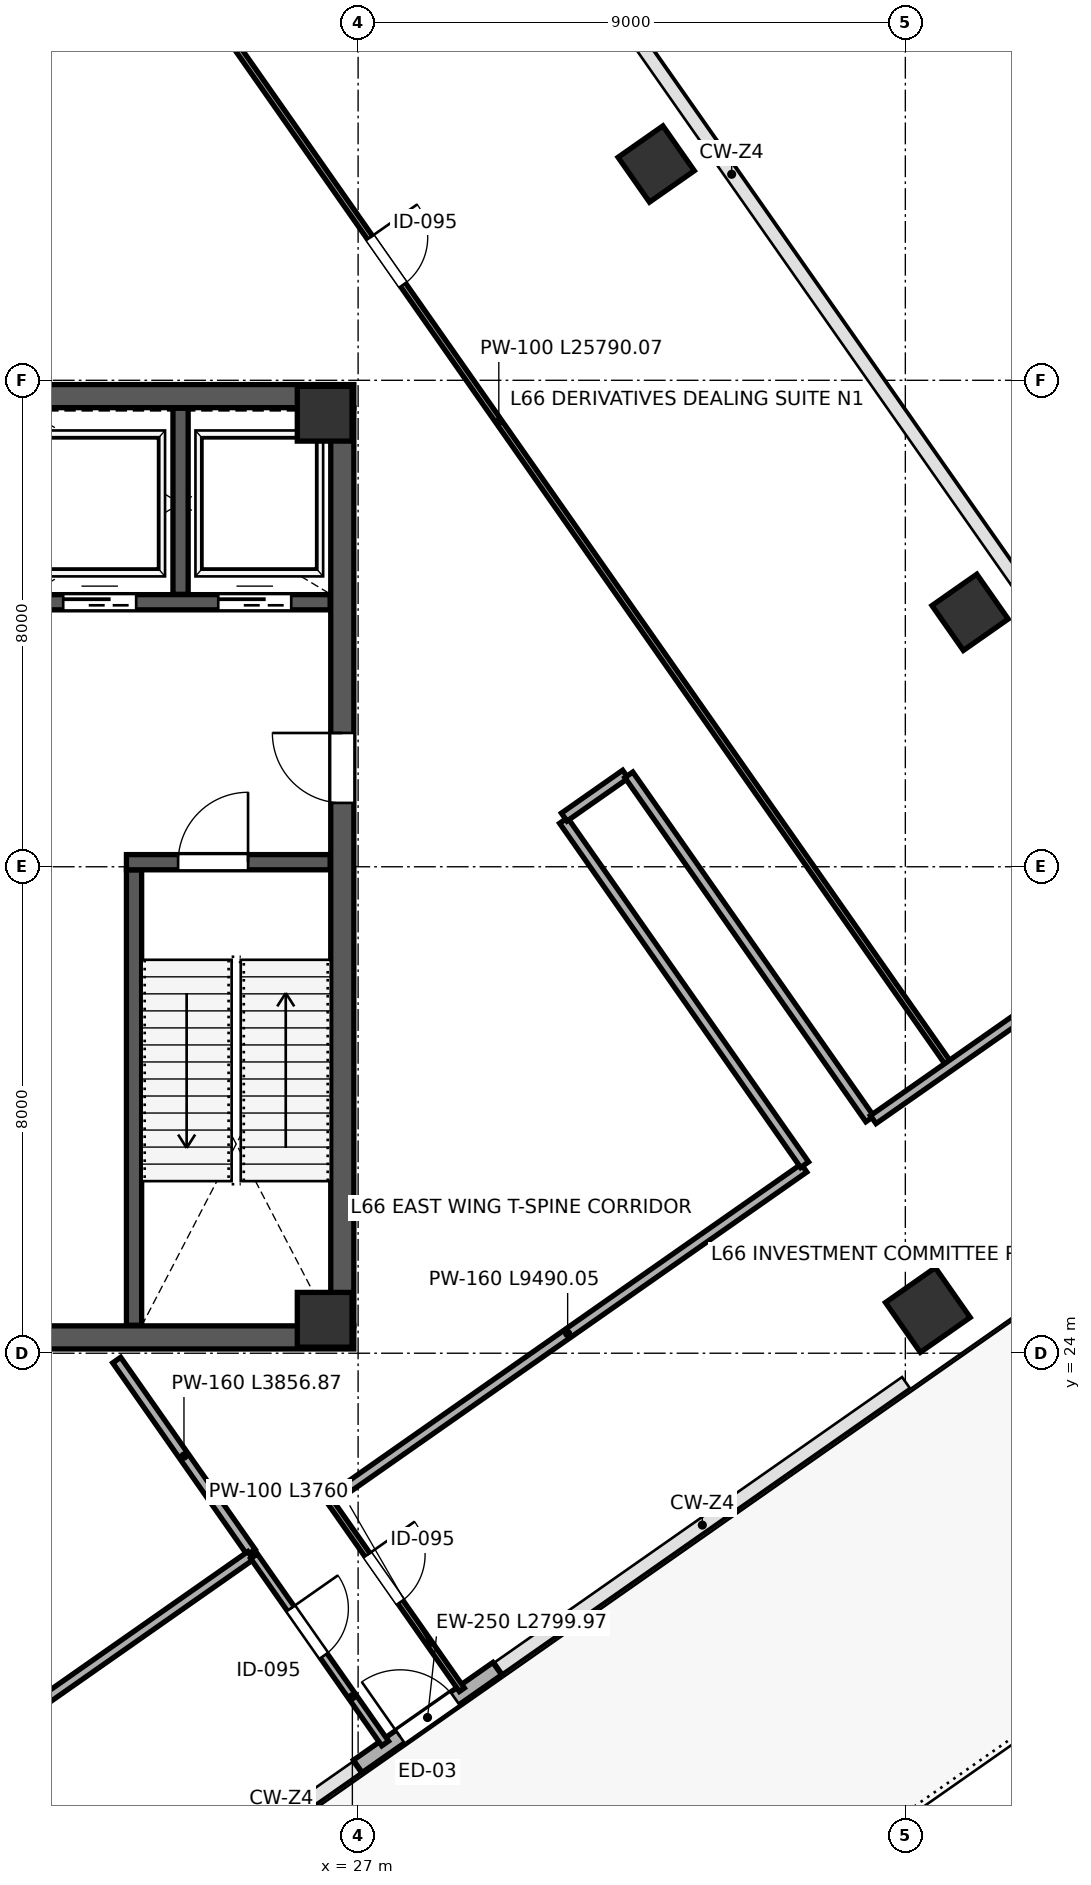
"""IFC4 building model, lengths in metres.
Left out: names, types, materials, properties, quantities, classifications, styles, units other than length and angle.
Written with IfcOpenShell. Run it as: python <this file> out.ifc"""

import sys

from ifc_helpers import new_model, si_unit, direction, frame, frame_2d, origin, origin_2d, place, context, subcontext, project, spatial, rectangle, extrude, source, transform, mapped, element, fill, save


model = new_model("IFC4")
c1 = context("Model", 3, precision=1e-05, world=origin(), true_north=direction((0.0, 1.0)))
c2 = subcontext(c1, "Body", "Model", "MODEL_VIEW")
j1 = project(units=[si_unit("LENGTHUNIT", "METRE"), si_unit("PLANEANGLEUNIT", "RADIAN")], contexts=[c1])
p1 = place(None, origin())
s1 = spatial("IfcSite", under=j1, at=p1, CompositionType="ELEMENT")
p2 = place(p1, origin())
s2 = spatial("IfcBuilding", under=s1, at=p2, CompositionType="ELEMENT")
p3 = place(p2, frame((0.0, 0.0, 293.8)))
s3 = spatial("IfcBuildingStorey", under=s2, at=p3, CompositionType="ELEMENT", Elevation=293.8)
m1 = source(origin(), c2, "Body", "SweptSolid", [
    extrude(rectangle(XDim=0.9, YDim=0.9, at=origin_2d()), origin(), (0.0, 0.0, 1.0), 4.999),
])
for number, where, z_axis, x_axis in (
    (1, (26.45, 24.55, 0.001), (0.0, 0.0, 1.0), (1.0, 0.0, 0.0)),
    (2, (26.45, 39.45, 0.001), (0.0, 0.0, 1.0), (1.0, 0.0, 0.0)),
):
    element("IfcColumn", number, at=place(p3, frame(where, z_axis=z_axis, x_axis=x_axis)), inside=s3, PredefinedType="COLUMN", context=c2, shape_type="MappedRepresentation", body=[
        mapped(m1, transform((0.0, 0.0, 0.0), scale=1.0)),
    ])
m2 = source(origin(), c2, "Body", "SweptSolid", [
    extrude(rectangle(XDim=0.9, YDim=0.9, at=origin_2d()), origin(), (0.0, 0.0, 1.0), 4.999),
])
for number, where, z_axis, x_axis in (
    (3, (31.903, 43.557, 0.001), (0.0, 0.0, 1.0), (-0.574, 0.819, 0.0)),
    (4, (37.065, 36.184, 0.001), (0.0, 0.0, 1.0), (-0.574, 0.819, 0.0)),
):
    element("IfcColumn", number, at=place(p3, frame(where, z_axis=z_axis, x_axis=x_axis)), inside=s3, PredefinedType="COLUMN", context=c2, shape_type="MappedRepresentation", body=[
        mapped(m2, transform((0.0, 0.0, 0.0), scale=1.0)),
    ])
m3 = source(origin(), c2, "Body", "SweptSolid", [
    extrude(rectangle(XDim=1.0, YDim=1.0, at=origin_2d()), origin(), (0.0, 0.0, 1.0), 4.999),
])
p4 = place(p3, frame((36.37, 24.711, 0.001), z_axis=(0.0, 0.0, 1.0), x_axis=(-0.573576436351, 0.819152044289, 0.0)))
e5 = element("IfcColumn", 5, at=p4, inside=s3, PredefinedType="COLUMN", context=c2, shape_type="MappedRepresentation", body=[
    mapped(m3, transform((0.0, 0.0, 0.0), scale=1.0)),
])
p5 = place(p3, frame((26.995, 17.206, 0.0), z_axis=(0.0, 0.0, 1.0), x_axis=(0.819141785879, 0.573591086599, 0.0)))
e6 = element("IfcWall", 6, at=p5, inside=s3, PredefinedType="SOLIDWALL", context=c2, shape_type="SweptSolid", body=[
    extrude(rectangle(XDim=2.8, YDim=0.25, at=frame_2d((1.4, 0.0))), origin(), (0.0, 0.0, 1.0), 4.76),
])
p6 = place(p5, frame((0.85, 0.0, 0.0)))
e7 = element("IfcOpeningElement", 7, at=p6, cuts=e6, PredefinedType="OPENING", context=c2, shape_type="SweptSolid", body=[
    extrude(rectangle(XDim=1.1, YDim=2.2, at=frame_2d((0.55, 1.1))), frame((0.0, 0.135, 0.0), z_axis=(0.0, -1.0, 0.0), x_axis=(1.0, 0.0, 0.0)), (0.0, 0.0, 1.0), 0.27),
])
p7 = place(p3, frame((26.74, 24.45, 0.0), z_axis=(0.0, 0.0, 1.0), x_axis=(0.0, 1.0, 0.0)))
e8 = element("IfcWall", 8, at=p7, inside=s3, PredefinedType="SHEAR", context=c2, shape_type="SweptSolid", body=[
    extrude(rectangle(XDim=15.1, YDim=0.38, at=frame_2d((7.55, 0.0))), origin(), (0.0, 0.0, 1.0), 4.76),
])
p8 = place(p7, frame((8.6, 0.0, 0.0)))
e9 = element("IfcOpeningElement", 9, at=p8, cuts=e8, PredefinedType="OPENING", context=c2, shape_type="SweptSolid", body=[
    extrude(rectangle(XDim=1.15, YDim=2.2, at=frame_2d((0.575, 1.1))), frame((0.0, 0.2, 0.0), z_axis=(0.0, -1.0, 0.0), x_axis=(1.0, 0.0, 0.0)), (0.0, 0.0, 1.0), 0.4),
])
for number, where, z_axis, x_axis in (
    (10, (9.07, 24.26, 0.0), (0.0, 0.0, 1.0), (1.0, 0.0, 0.0)),
    (11, (9.07, 39.74, 0.0), (0.0, 0.0, 1.0), (1.0, 0.0, 0.0)),
):
    element("IfcWall", number, at=place(p3, frame(where, z_axis=z_axis, x_axis=x_axis)), inside=s3, PredefinedType="SHEAR", context=c2, shape_type="SweptSolid", body=[
        extrude(rectangle(XDim=17.86, YDim=0.38, at=frame_2d((8.93, 0.0))), origin(), (0.0, 0.0, 1.0), 4.76),
    ])
p9 = place(p3, frame((23.315, 24.46, 0.0), z_axis=(0.0, 0.0, 1.0), x_axis=(0.0, 1.0, 0.0)))
e12 = element("IfcWall", 12, at=p9, inside=s3, PredefinedType="SHEAR", context=c2, shape_type="SweptSolid", body=[
    extrude(rectangle(XDim=7.49, YDim=0.25, at=frame_2d((3.745, 0.0))), origin(), (0.0, 0.0, 1.0), 4.76),
])
p10 = place(p3, frame((23.19, 32.075, 0.0), z_axis=(0.0, 0.0, 1.0), x_axis=(1.0, 0.0, 0.0)))
e13 = element("IfcWall", 13, at=p10, inside=s3, PredefinedType="SHEAR", context=c2, shape_type="SweptSolid", body=[
    extrude(rectangle(XDim=3.35, YDim=0.25, at=frame_2d((1.675, 0.0))), origin(), (0.0, 0.0, 1.0), 4.76),
])
p11 = place(p10, frame((0.85, 0.0, 0.0)))
e14 = element("IfcOpeningElement", 14, at=p11, cuts=e13, PredefinedType="OPENING", context=c2, shape_type="SweptSolid", body=[
    extrude(rectangle(XDim=1.15, YDim=2.2, at=frame_2d((0.575, 1.1))), frame((0.0, 0.135, 0.0), z_axis=(0.0, -1.0, 0.0), x_axis=(1.0, 0.0, 0.0)), (0.0, 0.0, 1.0), 0.27),
])
p12 = place(p3, frame((21.45, 36.35, 0.0), z_axis=(0.0, 0.0, 1.0), x_axis=(1.0, 0.0, 0.0)))
e15 = element("IfcWall", 15, at=p12, inside=s3, PredefinedType="SHEAR", context=c2, shape_type="SweptSolid", body=[
    extrude(rectangle(XDim=5.09, YDim=0.25, at=frame_2d((2.545, 0.0))), origin(), (0.0, 0.0, 1.0), 4.76),
])
p13 = place(p12, frame((0.7, 0.0, 0.0)))
e16 = element("IfcOpeningElement", 16, at=p13, cuts=e15, PredefinedType="OPENING", context=c2, shape_type="SweptSolid", body=[
    extrude(rectangle(XDim=1.2, YDim=2.2, at=frame_2d((0.6, 1.1))), frame((0.0, 0.135, 0.0), z_axis=(0.0, -1.0, 0.0), x_axis=(1.0, 0.0, 0.0)), (0.0, 0.0, 1.0), 0.27),
])
p14 = place(p12, frame((3.25, 0.0, 0.0)))
e17 = element("IfcOpeningElement", 17, at=p14, cuts=e15, PredefinedType="OPENING", context=c2, shape_type="SweptSolid", body=[
    extrude(rectangle(XDim=1.2, YDim=2.2, at=frame_2d((0.6, 1.1))), frame((0.0, 0.135, 0.0), z_axis=(0.0, -1.0, 0.0), x_axis=(1.0, 0.0, 0.0)), (0.0, 0.0, 1.0), 0.27),
])
p15 = place(p3, frame((24.08, 36.48, 0.0), z_axis=(0.0, 0.0, 1.0), x_axis=(0.0, 1.0, 0.0)))
e18 = element("IfcWall", 18, at=p15, inside=s3, PredefinedType="SHEAR", context=c2, shape_type="SweptSolid", body=[
    extrude(rectangle(XDim=3.06, YDim=0.25, at=frame_2d((1.53, 0.0))), origin(), (0.0, 0.0, 1.0), 4.76),
])
p16 = place(p3, frame((23.03, 23.887, 0.0), z_axis=(0.0, 0.0, 1.0), x_axis=(0.573602525203, -0.819133776059, 0.0)))
e19 = element("IfcWall", 19, at=p16, inside=s3, PredefinedType="PARTITIONING", context=c2, shape_type="SweptSolid", body=[
    extrude(rectangle(XDim=3.857, YDim=0.16, at=frame_2d((1.928, 0.0))), origin(), (0.0, 0.0, 1.0), 4.76),
])
p17 = place(p3, frame((21.918, 49.884, 0.0), z_axis=(0.0, 0.0, 1.0), x_axis=(0.57358495776, -0.819146077468, 0.0)))
e20 = element("IfcWall", 20, at=p17, inside=s3, PredefinedType="PARTITIONING", context=c2, shape_type="SweptSolid", body=[
    extrude(rectangle(XDim=25.79, YDim=0.1, at=frame_2d((12.895, 0.0))), origin(), (0.0, 0.0, 1.0), 4.76),
])
p18 = place(p17, frame((9.2, 0.0, 0.0)))
e21 = element("IfcOpeningElement", 21, at=p18, cuts=e20, PredefinedType="OPENING", context=c2, shape_type="SweptSolid", body=[
    extrude(rectangle(XDim=0.95, YDim=2.15, at=frame_2d((0.475, 1.075))), frame((0.0, 0.06, 0.0), z_axis=(0.0, -1.0, 0.0), x_axis=(1.0, 0.0, 0.0)), (0.0, 0.0, 1.0), 0.12),
])
p19 = place(p3, frame((2.071, 36.036, 0.0), z_axis=(0.0, 0.0, 1.0), x_axis=(0.819154854942, 0.573572422302, 0.0)))
e22 = element("IfcWall", 22, at=p19, inside=s3, PredefinedType="PARTITIONING", context=c2, shape_type="SweptSolid", body=[
    extrude(rectangle(XDim=29.62, YDim=0.115, at=frame_2d((14.81, 0.0))), origin(), (0.0, 0.0, 1.0), 4.76),
])
p20 = place(p19, frame((4.2, 0.0, 0.0)))
e23 = element("IfcOpeningElement", 23, at=p20, cuts=e22, PredefinedType="OPENING", context=c2, shape_type="SweptSolid", body=[
    extrude(rectangle(XDim=0.95, YDim=2.15, at=frame_2d((0.475, 1.075))), frame((0.0, 0.067, 0.0), z_axis=(0.0, -1.0, 0.0), x_axis=(1.0, 0.0, 0.0)), (0.0, 0.0, 1.0), 0.135),
])
p21 = place(p3, frame((26.559, 21.601, 0.0), z_axis=(0.0, 0.0, 1.0), x_axis=(0.819143682501, 0.573588378036, 0.0)))
e24 = element("IfcWall", 24, at=p21, inside=s3, PredefinedType="PARTITIONING", context=c2, shape_type="SweptSolid", body=[
    extrude(rectangle(XDim=9.49, YDim=0.16, at=frame_2d((4.745, 0.0))), origin(), (0.0, 0.0, 1.0), 4.76),
])
p22 = place(p3, frame((30.379, 32.76, 0.0), z_axis=(0.0, 0.0, 1.0), x_axis=(0.573609352737, -0.819128995002, 0.0)))
e25 = element("IfcWall", 25, at=p22, inside=s3, PredefinedType="PARTITIONING", context=c2, shape_type="SweptSolid", body=[
    extrude(rectangle(XDim=6.91, YDim=0.16, at=frame_2d((3.455, 0.0))), origin(), (0.0, 0.0, 1.0), 4.76),
])
p23 = place(p3, frame((30.389, 32.816, 0.0), z_axis=(0.0, 0.0, 1.0), x_axis=(0.819129336916, 0.573608864475, 0.0)))
e26 = element("IfcWall", 26, at=p23, inside=s3, PredefinedType="PARTITIONING", context=c2, shape_type="SweptSolid", body=[
    extrude(rectangle(XDim=1.23, YDim=0.16, at=frame_2d((0.615, 0.0))), origin(), (0.0, 0.0, 1.0), 4.76),
])
p24 = place(p3, frame((31.453, 33.512, 0.0), z_axis=(0.0, 0.0, 1.0), x_axis=(0.573585645457, -0.819145595927, 0.0)))
e27 = element("IfcWall", 27, at=p24, inside=s3, PredefinedType="PARTITIONING", context=c2, shape_type="SweptSolid", body=[
    extrude(rectangle(XDim=6.91, YDim=0.16, at=frame_2d((3.455, 0.0))), origin(), (0.0, 0.0, 1.0), 4.76),
])
p25 = place(p3, frame((35.472, 27.842, 0.0), z_axis=(0.0, 0.0, 1.0), x_axis=(0.819151164872, 0.573577692287, 0.0)))
e28 = element("IfcWall", 28, at=p25, inside=s3, PredefinedType="PARTITIONING", context=c2, shape_type="SweptSolid", body=[
    extrude(rectangle(XDim=6.96, YDim=0.16, at=frame_2d((3.48, 0.0))), origin(), (0.0, 0.0, 1.0), 4.76),
])
p26 = place(p3, frame((15.747, 14.03, 0.0), z_axis=(0.0, 0.0, 1.0), x_axis=(0.819150694041, 0.573578364701, 0.0)))
e29 = element("IfcWall", 29, at=p26, inside=s3, PredefinedType="PARTITIONING", context=c2, shape_type="SweptSolid", body=[
    extrude(rectangle(XDim=11.58, YDim=0.16, at=frame_2d((5.79, 0.0))), origin(), (0.0, 0.0, 1.0), 4.76),
])
p27 = place(p3, frame((26.55, 21.546, 0.0), z_axis=(0.0, 0.0, 1.0), x_axis=(0.573614860738, -0.8191251379, 0.0)))
e30 = element("IfcWall", 30, at=p27, inside=s3, PredefinedType="PARTITIONING", context=c2, shape_type="SweptSolid", body=[
    extrude(rectangle(XDim=3.76, YDim=0.1, at=frame_2d((1.88, 0.0))), origin(), (0.0, 0.0, 1.0), 4.76),
])
p28 = place(p27, frame((1.05, 0.0, 0.0)))
e31 = element("IfcOpeningElement", 31, at=p28, cuts=e30, PredefinedType="OPENING", context=c2, shape_type="SweptSolid", body=[
    extrude(rectangle(XDim=0.95, YDim=2.15, at=frame_2d((0.475, 1.075))), frame((0.0, 0.06, 0.0), z_axis=(0.0, -1.0, 0.0), x_axis=(1.0, 0.0, 0.0)), (0.0, 0.0, 1.0), 0.12),
])
p29 = place(p3, frame((25.288, 20.662, 0.0), z_axis=(0.0, 0.0, 1.0), x_axis=(0.573614860738, -0.8191251379, 0.0)))
e32 = element("IfcWall", 32, at=p29, inside=s3, PredefinedType="PARTITIONING", context=c2, shape_type="SweptSolid", body=[
    extrude(rectangle(XDim=3.76, YDim=0.135, at=frame_2d((1.88, 0.0))), origin(), (0.0, 0.0, 1.0), 4.76),
])
p30 = place(p29, frame((1.05, 0.0, 0.0)))
e33 = element("IfcOpeningElement", 33, at=p30, cuts=e32, PredefinedType="OPENING", context=c2, shape_type="SweptSolid", body=[
    extrude(rectangle(XDim=0.95, YDim=2.15, at=frame_2d((0.475, 1.075))), frame((0.0, 0.078, 0.0), z_axis=(0.0, -1.0, 0.0), x_axis=(1.0, 0.0, 0.0)), (0.0, 0.0, 1.0), 0.155),
])
m4 = source(origin(), c2, "Body", "SweptSolid", [
    extrude(rectangle(XDim=1.1, YDim=2.2, at=frame_2d((0.55, 1.1))), frame((0.0, 0.025, 0.0), z_axis=(0.0, -1.0, 0.0), x_axis=(1.0, 0.0, 0.0)), (0.0, 0.0, 1.0), 0.05),
])
p31 = place(p6, origin())
e34 = element("IfcDoor", 34, at=p31, inside=s3, OperationType="SINGLE_SWING_LEFT", PredefinedType="DOOR", context=c2, shape_type="MappedRepresentation", body=[
    mapped(m4, transform((0.0, 0.0, 0.0), scale=1.0)),
])
fill(e7, e34)
m5 = source(origin(), c2, "Body", "SweptSolid", [
    extrude(rectangle(XDim=1.15, YDim=2.2, at=frame_2d((0.575, 1.1))), frame((0.0, 0.025, 0.0), z_axis=(0.0, -1.0, 0.0), x_axis=(1.0, 0.0, 0.0)), (0.0, 0.0, 1.0), 0.05),
])
p32 = place(p11, origin())
e35 = element("IfcDoor", 35, at=p32, inside=s3, OperationType="SINGLE_SWING_RIGHT", PredefinedType="DOOR", context=c2, shape_type="MappedRepresentation", body=[
    mapped(m5, transform((0.0, 0.0, 0.0), scale=1.0)),
])
fill(e14, e35)
m6 = source(origin(), c2, "Body", "SweptSolid", [
    extrude(rectangle(XDim=1.15, YDim=2.2, at=frame_2d((0.575, 1.1))), frame((0.0, 0.025, 0.0), z_axis=(0.0, -1.0, 0.0), x_axis=(1.0, 0.0, 0.0)), (0.0, 0.0, 1.0), 0.05),
])
p33 = place(p8, origin())
e36 = element("IfcDoor", 36, at=p33, inside=s3, OperationType="SINGLE_SWING_RIGHT", PredefinedType="DOOR", context=c2, shape_type="MappedRepresentation", body=[
    mapped(m6, transform((0.0, 0.0, 0.0), scale=1.0)),
])
fill(e9, e36)
m7 = source(origin(), c2, "Body", "SweptSolid", [
    extrude(rectangle(XDim=1.2, YDim=2.2, at=frame_2d((0.6, 1.1))), frame((0.0, 0.025, 0.0), z_axis=(0.0, -1.0, 0.0), x_axis=(1.0, 0.0, 0.0)), (0.0, 0.0, 1.0), 0.05),
])
p34 = place(p13, origin())
e37 = element("IfcDoor", 37, at=p34, inside=s3, OperationType="SLIDING_TO_LEFT", PredefinedType="DOOR", context=c2, shape_type="MappedRepresentation", body=[
    mapped(m7, transform((0.0, 0.0, 0.0), scale=1.0)),
])
fill(e16, e37)
p35 = place(p14, origin())
e38 = element("IfcDoor", 38, at=p35, inside=s3, OperationType="SLIDING_TO_RIGHT", PredefinedType="DOOR", context=c2, shape_type="MappedRepresentation", body=[
    mapped(m7, transform((0.0, 0.0, 0.0), scale=1.0)),
])
fill(e17, e38)
m8 = source(origin(), c2, "Body", "SweptSolid", [
    extrude(rectangle(XDim=0.95, YDim=2.15, at=frame_2d((0.475, 1.075))), frame((0.0, 0.025, 0.0), z_axis=(0.0, -1.0, 0.0), x_axis=(1.0, 0.0, 0.0)), (0.0, 0.0, 1.0), 0.05),
])
p36 = place(p18, origin())
e39 = element("IfcDoor", 39, at=p36, inside=s3, OperationType="SINGLE_SWING_LEFT", PredefinedType="DOOR", context=c2, shape_type="MappedRepresentation", body=[
    mapped(m8, transform((0.0, 0.0, 0.0), scale=1.0)),
])
fill(e21, e39)
p37 = place(p28, origin())
e40 = element("IfcDoor", 40, at=p37, inside=s3, OperationType="SINGLE_SWING_LEFT", PredefinedType="DOOR", context=c2, shape_type="MappedRepresentation", body=[
    mapped(m8, transform((0.0, 0.0, 0.0), scale=1.0)),
])
fill(e31, e40)
p38 = place(p30, origin())
e41 = element("IfcDoor", 41, at=p38, inside=s3, OperationType="SINGLE_SWING_LEFT", PredefinedType="DOOR", context=c2, shape_type="MappedRepresentation", body=[
    mapped(m8, transform((0.0, 0.0, 0.0), scale=1.0)),
])
fill(e33, e41)
save(model, sys.argv[1])
